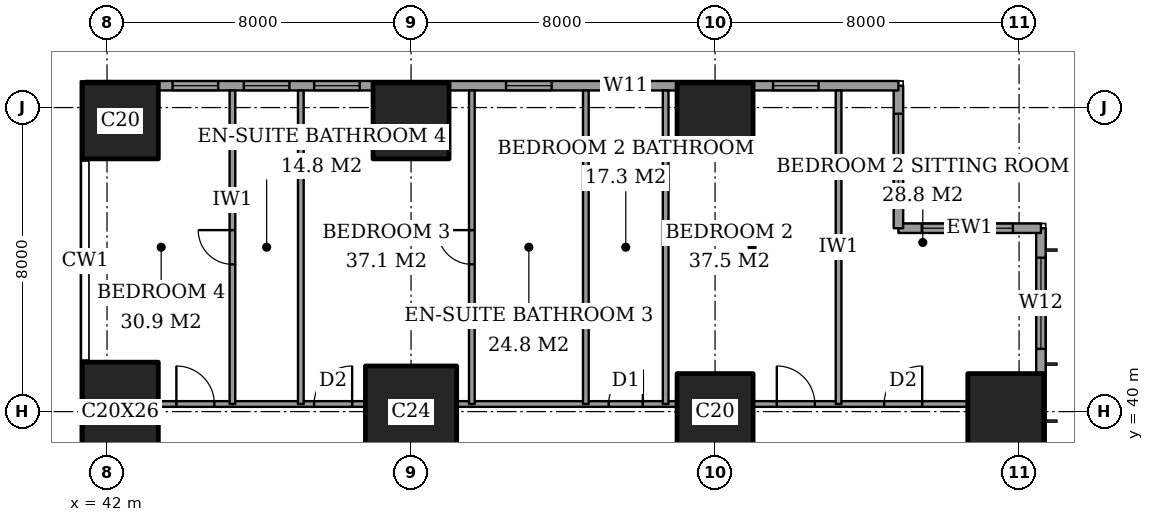
"""IFC4 building model, lengths in metres.
Left out: names, types, materials, properties, quantities, classifications, styles, units other than length and angle.
Written with IfcOpenShell. Run it as: python <this file> out.ifc"""

import sys

from ifc_helpers import new_model, si_unit, direction, frame, frame_2d, origin, origin_2d, place, context, subcontext, project, spatial, rectangle, extrude, element, fill, save


model = new_model("IFC4")
c1 = context("Model", 3, precision=1e-05, world=origin(), true_north=direction((0.0, 1.0)))
c2 = subcontext(c1, "Body", "Model", "MODEL_VIEW")
j1 = project(units=[si_unit("LENGTHUNIT", "METRE"), si_unit("PLANEANGLEUNIT", "RADIAN")], contexts=[c1])
p1 = place(None, origin())
s1 = spatial("IfcSite", under=j1, at=p1, CompositionType="ELEMENT")
p2 = place(p1, origin())
s2 = spatial("IfcBuilding", under=s1, at=p2, CompositionType="ELEMENT")
p3 = place(p2, frame((0.0, 0.0, 153.8)))
s3 = spatial("IfcBuildingStorey", under=s2, at=p3, CompositionType="ELEMENT", Elevation=153.8)
p4 = place(p3, frame((42.35, 40.0, 0.0), z_axis=(0.0, 0.0, 1.0), x_axis=(1.0, 0.0, 0.0)))
e1 = element("IfcColumn", 1, at=p4, inside=s3, PredefinedType="COLUMN", context=c2, shape_type="SweptSolid", body=[
    extrude(rectangle(XDim=2.0, YDim=2.6, at=origin_2d()), origin(), (0.0, 0.0, 1.0), 3.6),
])
p5 = place(p3, frame((42.35, 47.65, 0.0), z_axis=(0.0, 0.0, 1.0), x_axis=(1.0, 0.0, 0.0)))
e2 = element("IfcColumn", 2, at=p5, inside=s3, PredefinedType="COLUMN", context=c2, shape_type="SweptSolid", body=[
    extrude(rectangle(XDim=2.0, YDim=2.0, at=origin_2d()), origin(), (0.0, 0.0, 1.0), 3.6),
])
p6 = place(p3, frame((50.0, 40.0, 0.0), z_axis=(0.0, 0.0, 1.0), x_axis=(1.0, 0.0, 0.0)))
e3 = element("IfcColumn", 3, at=p6, inside=s3, PredefinedType="COLUMN", context=c2, shape_type="SweptSolid", body=[
    extrude(rectangle(XDim=2.4, YDim=2.4, at=origin_2d()), origin(), (0.0, 0.0, 1.0), 3.6),
])
for number, where, z_axis, x_axis in (
    (4, (50.0, 47.65, 0.0), (0.0, 0.0, 1.0), (1.0, 0.0, 0.0)),
    (5, (58.0, 40.0, 0.0), (0.0, 0.0, 1.0), (1.0, 0.0, 0.0)),
    (6, (58.0, 47.65, 0.0), (0.0, 0.0, 1.0), (1.0, 0.0, 0.0)),
    (7, (65.65, 40.0, 0.0), (0.0, 0.0, 1.0), (1.0, 0.0, 0.0)),
):
    element("IfcColumn", number, at=place(p3, frame(where, z_axis=z_axis, x_axis=x_axis)), inside=s3, PredefinedType="COLUMN", context=c2, shape_type="SweptSolid", body=[
        extrude(rectangle(XDim=2.0, YDim=2.0, at=origin_2d()), origin(), (0.0, 0.0, 1.0), 3.6),
    ])
p7 = place(p3, frame((66.575, 3.175, 0.0), z_axis=(0.0, 0.0, 1.0), x_axis=(0.0, 1.0, 0.0)))
e8 = element("IfcWall", 8, at=p7, inside=s3, PredefinedType="SOLIDWALL", context=c2, shape_type="SweptSolid", body=[
    extrude(rectangle(XDim=41.65, YDim=0.25, at=frame_2d((20.825, 0.0))), origin(), (0.0, 0.0, 1.0), 3.6),
])
p8 = place(p7, frame((0.775, 0.0, 0.4)))
e9 = element("IfcOpeningElement", 9, at=p8, cuts=e8, PredefinedType="OPENING", context=c2, shape_type="SweptSolid", body=[
    extrude(rectangle(XDim=2.4, YDim=2.2, at=frame_2d((1.2, 1.1))), frame((0.0, 0.135, 0.0), z_axis=(0.0, -1.0, 0.0), x_axis=(1.0, 0.0, 0.0)), (0.0, 0.0, 1.0), 0.27),
])
p9 = place(p7, frame((6.225, 0.0, 0.4)))
e10 = element("IfcOpeningElement", 10, at=p9, cuts=e8, PredefinedType="OPENING", context=c2, shape_type="SweptSolid", body=[
    extrude(rectangle(XDim=1.2, YDim=2.2, at=frame_2d((0.6, 1.1))), frame((0.0, 0.135, 0.0), z_axis=(0.0, -1.0, 0.0), x_axis=(1.0, 0.0, 0.0)), (0.0, 0.0, 1.0), 0.27),
])
p10 = place(p7, frame((8.475, 0.0, 0.4)))
e11 = element("IfcOpeningElement", 11, at=p10, cuts=e8, PredefinedType="OPENING", context=c2, shape_type="SweptSolid", body=[
    extrude(rectangle(XDim=2.4, YDim=2.2, at=frame_2d((1.2, 1.1))), frame((0.0, 0.135, 0.0), z_axis=(0.0, -1.0, 0.0), x_axis=(1.0, 0.0, 0.0)), (0.0, 0.0, 1.0), 0.27),
])
p11 = place(p7, frame((15.775, 0.0, 0.4)))
e12 = element("IfcOpeningElement", 12, at=p11, cuts=e8, PredefinedType="OPENING", context=c2, shape_type="SweptSolid", body=[
    extrude(rectangle(XDim=2.4, YDim=2.2, at=frame_2d((1.2, 1.1))), frame((0.0, 0.135, 0.0), z_axis=(0.0, -1.0, 0.0), x_axis=(1.0, 0.0, 0.0)), (0.0, 0.0, 1.0), 0.27),
])
p12 = place(p7, frame((23.475, 0.0, 0.4)))
e13 = element("IfcOpeningElement", 13, at=p12, cuts=e8, PredefinedType="OPENING", context=c2, shape_type="SweptSolid", body=[
    extrude(rectangle(XDim=2.4, YDim=2.2, at=frame_2d((1.2, 1.1))), frame((0.0, 0.135, 0.0), z_axis=(0.0, -1.0, 0.0), x_axis=(1.0, 0.0, 0.0)), (0.0, 0.0, 1.0), 0.27),
])
p13 = place(p7, frame((30.975, 0.0, 0.4)))
e14 = element("IfcOpeningElement", 14, at=p13, cuts=e8, PredefinedType="OPENING", context=c2, shape_type="SweptSolid", body=[
    extrude(rectangle(XDim=2.4, YDim=2.2, at=frame_2d((1.2, 1.1))), frame((0.0, 0.135, 0.0), z_axis=(0.0, -1.0, 0.0), x_axis=(1.0, 0.0, 0.0)), (0.0, 0.0, 1.0), 0.27),
])
p14 = place(p7, frame((34.5, 0.0, 0.4)))
e15 = element("IfcOpeningElement", 15, at=p14, cuts=e8, PredefinedType="OPENING", context=c2, shape_type="SweptSolid", body=[
    extrude(rectangle(XDim=1.2, YDim=2.2, at=frame_2d((0.6, 1.1))), frame((0.0, 0.135, 0.0), z_axis=(0.0, -1.0, 0.0), x_axis=(1.0, 0.0, 0.0)), (0.0, 0.0, 1.0), 0.27),
])
p15 = place(p7, frame((38.475, 0.0, 0.4)))
e16 = element("IfcOpeningElement", 16, at=p15, cuts=e8, PredefinedType="OPENING", context=c2, shape_type="SweptSolid", body=[
    extrude(rectangle(XDim=2.4, YDim=2.2, at=frame_2d((1.2, 1.1))), frame((0.0, 0.135, 0.0), z_axis=(0.0, -1.0, 0.0), x_axis=(1.0, 0.0, 0.0)), (0.0, 0.0, 1.0), 0.27),
])
p16 = place(p3, frame((66.575, 44.825, 0.0), z_axis=(0.0, 0.0, 1.0), x_axis=(-1.0, 0.0, 0.0)))
e17 = element("IfcWall", 17, at=p16, inside=s3, PredefinedType="SOLIDWALL", context=c2, shape_type="SweptSolid", body=[
    extrude(rectangle(XDim=3.75, YDim=0.25, at=frame_2d((1.875, 0.0))), origin(), (0.0, 0.0, 1.0), 3.6),
])
p17 = place(p16, frame((0.738, 0.0, 0.4)))
e18 = element("IfcOpeningElement", 18, at=p17, cuts=e17, PredefinedType="OPENING", context=c2, shape_type="SweptSolid", body=[
    extrude(rectangle(XDim=2.4, YDim=2.2, at=frame_2d((1.2, 1.1))), frame((0.0, 0.135, 0.0), z_axis=(0.0, -1.0, 0.0), x_axis=(1.0, 0.0, 0.0)), (0.0, 0.0, 1.0), 0.27),
])
p18 = place(p3, frame((62.825, 44.825, 0.0), z_axis=(0.0, 0.0, 1.0), x_axis=(0.0, 1.0, 0.0)))
e19 = element("IfcWall", 19, at=p18, inside=s3, PredefinedType="SOLIDWALL", context=c2, shape_type="SweptSolid", body=[
    extrude(rectangle(XDim=3.75, YDim=0.25, at=frame_2d((1.875, 0.0))), origin(), (0.0, 0.0, 1.0), 3.6),
])
p19 = place(p18, frame((0.613, 0.0, 0.4)))
e20 = element("IfcOpeningElement", 20, at=p19, cuts=e19, PredefinedType="OPENING", context=c2, shape_type="SweptSolid", body=[
    extrude(rectangle(XDim=2.4, YDim=2.2, at=frame_2d((1.2, 1.1))), frame((0.0, 0.135, 0.0), z_axis=(0.0, -1.0, 0.0), x_axis=(1.0, 0.0, 0.0)), (0.0, 0.0, 1.0), 0.27),
])
p20 = place(p3, frame((62.825, 48.575, 0.0), z_axis=(0.0, 0.0, 1.0), x_axis=(-1.0, 0.0, 0.0)))
e21 = element("IfcWall", 21, at=p20, inside=s3, PredefinedType="SOLIDWALL", context=c2, shape_type="SweptSolid", body=[
    extrude(rectangle(XDim=21.4, YDim=0.25, at=frame_2d((10.7, 0.0))), origin(), (0.0, 0.0, 1.0), 3.6),
])
p21 = place(p20, frame((2.1, 0.0, 0.4)))
e22 = element("IfcOpeningElement", 22, at=p21, cuts=e21, PredefinedType="OPENING", context=c2, shape_type="SweptSolid", body=[
    extrude(rectangle(XDim=1.2, YDim=2.2, at=frame_2d((0.6, 1.1))), frame((0.0, 0.135, 0.0), z_axis=(0.0, -1.0, 0.0), x_axis=(1.0, 0.0, 0.0)), (0.0, 0.0, 1.0), 0.27),
])
p22 = place(p20, frame((6.575, 0.0, 0.4)))
e23 = element("IfcOpeningElement", 23, at=p22, cuts=e21, PredefinedType="OPENING", context=c2, shape_type="SweptSolid", body=[
    extrude(rectangle(XDim=1.2, YDim=2.2, at=frame_2d((0.6, 1.1))), frame((0.0, 0.135, 0.0), z_axis=(0.0, -1.0, 0.0), x_axis=(1.0, 0.0, 0.0)), (0.0, 0.0, 1.0), 0.27),
])
p23 = place(p20, frame((9.125, 0.0, 0.4)))
e24 = element("IfcOpeningElement", 24, at=p23, cuts=e21, PredefinedType="OPENING", context=c2, shape_type="SweptSolid", body=[
    extrude(rectangle(XDim=1.2, YDim=2.2, at=frame_2d((0.6, 1.1))), frame((0.0, 0.135, 0.0), z_axis=(0.0, -1.0, 0.0), x_axis=(1.0, 0.0, 0.0)), (0.0, 0.0, 1.0), 0.27),
])
p24 = place(p20, frame((14.175, 0.0, 0.4)))
e25 = element("IfcOpeningElement", 25, at=p24, cuts=e21, PredefinedType="OPENING", context=c2, shape_type="SweptSolid", body=[
    extrude(rectangle(XDim=1.2, YDim=2.2, at=frame_2d((0.6, 1.1))), frame((0.0, 0.135, 0.0), z_axis=(0.0, -1.0, 0.0), x_axis=(1.0, 0.0, 0.0)), (0.0, 0.0, 1.0), 0.27),
])
p25 = place(p20, frame((16.025, 0.0, 0.4)))
e26 = element("IfcOpeningElement", 26, at=p25, cuts=e21, PredefinedType="OPENING", context=c2, shape_type="SweptSolid", body=[
    extrude(rectangle(XDim=1.2, YDim=2.2, at=frame_2d((0.6, 1.1))), frame((0.0, 0.135, 0.0), z_axis=(0.0, -1.0, 0.0), x_axis=(1.0, 0.0, 0.0)), (0.0, 0.0, 1.0), 0.27),
])
p26 = place(p20, frame((17.9, 0.0, 0.4)))
e27 = element("IfcOpeningElement", 27, at=p26, cuts=e21, PredefinedType="OPENING", context=c2, shape_type="SweptSolid", body=[
    extrude(rectangle(XDim=1.2, YDim=2.2, at=frame_2d((0.6, 1.1))), frame((0.0, 0.135, 0.0), z_axis=(0.0, -1.0, 0.0), x_axis=(1.0, 0.0, 0.0)), (0.0, 0.0, 1.0), 0.27),
])
p27 = place(p3, frame((43.35, 40.2, 0.0), z_axis=(0.0, 0.0, 1.0), x_axis=(1.0, 0.0, 0.0)))
e28 = element("IfcWall", 28, at=p27, inside=s3, PredefinedType="PARTITIONING", context=c2, shape_type="SweptSolid", body=[
    extrude(rectangle(XDim=5.45, YDim=0.15, at=frame_2d((2.725, 0.0))), origin(), (0.0, 0.0, 1.0), 3.35),
])
p28 = place(p27, frame((4.1, 0.0, 0.0)))
e29 = element("IfcOpeningElement", 29, at=p28, cuts=e28, PredefinedType="OPENING", context=c2, shape_type="SweptSolid", body=[
    extrude(rectangle(XDim=1.0, YDim=2.1, at=frame_2d((0.5, 1.05))), frame((0.0, 0.085, 0.0), z_axis=(0.0, -1.0, 0.0), x_axis=(1.0, 0.0, 0.0)), (0.0, 0.0, 1.0), 0.17),
])
p29 = place(p27, frame((0.475, 0.0, 0.0)))
e30 = element("IfcOpeningElement", 30, at=p29, cuts=e28, PredefinedType="OPENING", context=c2, shape_type="SweptSolid", body=[
    extrude(rectangle(XDim=1.0, YDim=2.1, at=frame_2d((0.5, 1.05))), frame((0.0, 0.085, 0.0), z_axis=(0.0, -1.0, 0.0), x_axis=(1.0, 0.0, 0.0)), (0.0, 0.0, 1.0), 0.17),
])
p30 = place(p3, frame((51.2, 40.2, 0.0), z_axis=(0.0, 0.0, 1.0), x_axis=(1.0, 0.0, 0.0)))
e31 = element("IfcWall", 31, at=p30, inside=s3, PredefinedType="PARTITIONING", context=c2, shape_type="SweptSolid", body=[
    extrude(rectangle(XDim=5.8, YDim=0.15, at=frame_2d((2.9, 0.0))), origin(), (0.0, 0.0, 1.0), 3.35),
])
p31 = place(p30, frame((4.0, 0.0, 0.0)))
e32 = element("IfcOpeningElement", 32, at=p31, cuts=e31, PredefinedType="OPENING", context=c2, shape_type="SweptSolid", body=[
    extrude(rectangle(XDim=0.9, YDim=2.1, at=frame_2d((0.45, 1.05))), frame((0.0, 0.085, 0.0), z_axis=(0.0, -1.0, 0.0), x_axis=(1.0, 0.0, 0.0)), (0.0, 0.0, 1.0), 0.17),
])
p32 = place(p3, frame((59.0, 40.2, 0.0), z_axis=(0.0, 0.0, 1.0), x_axis=(1.0, 0.0, 0.0)))
e33 = element("IfcWall", 33, at=p32, inside=s3, PredefinedType="PARTITIONING", context=c2, shape_type="SweptSolid", body=[
    extrude(rectangle(XDim=5.65, YDim=0.15, at=frame_2d((2.825, 0.0))), origin(), (0.0, 0.0, 1.0), 3.35),
])
p33 = place(p32, frame((3.45, 0.0, 0.0)))
e34 = element("IfcOpeningElement", 34, at=p33, cuts=e33, PredefinedType="OPENING", context=c2, shape_type="SweptSolid", body=[
    extrude(rectangle(XDim=1.0, YDim=2.1, at=frame_2d((0.5, 1.05))), frame((0.0, 0.085, 0.0), z_axis=(0.0, -1.0, 0.0), x_axis=(1.0, 0.0, 0.0)), (0.0, 0.0, 1.0), 0.17),
])
p34 = place(p32, frame((0.625, 0.0, 0.0)))
e35 = element("IfcOpeningElement", 35, at=p34, cuts=e33, PredefinedType="OPENING", context=c2, shape_type="SweptSolid", body=[
    extrude(rectangle(XDim=1.0, YDim=2.1, at=frame_2d((0.5, 1.05))), frame((0.0, 0.085, 0.0), z_axis=(0.0, -1.0, 0.0), x_axis=(1.0, 0.0, 0.0)), (0.0, 0.0, 1.0), 0.17),
])
p35 = place(p3, frame((45.3, 40.2, 0.0), z_axis=(0.0, 0.0, 1.0), x_axis=(0.0, 1.0, 0.0)))
e36 = element("IfcWall", 36, at=p35, inside=s3, PredefinedType="PARTITIONING", context=c2, shape_type="SweptSolid", body=[
    extrude(rectangle(XDim=8.25, YDim=0.15, at=frame_2d((4.125, 0.0))), origin(), (0.0, 0.0, 1.0), 3.35),
])
p36 = place(p35, frame((3.675, 0.0, 0.0)))
e37 = element("IfcOpeningElement", 37, at=p36, cuts=e36, PredefinedType="OPENING", context=c2, shape_type="SweptSolid", body=[
    extrude(rectangle(XDim=0.9, YDim=2.1, at=frame_2d((0.45, 1.05))), frame((0.0, 0.085, 0.0), z_axis=(0.0, -1.0, 0.0), x_axis=(1.0, 0.0, 0.0)), (0.0, 0.0, 1.0), 0.17),
])
p37 = place(p3, frame((47.1, 40.2, 0.0), z_axis=(0.0, 0.0, 1.0), x_axis=(0.0, 1.0, 0.0)))
e38 = element("IfcWall", 38, at=p37, inside=s3, PredefinedType="PARTITIONING", context=c2, shape_type="SweptSolid", body=[
    extrude(rectangle(XDim=8.25, YDim=0.15, at=frame_2d((4.125, 0.0))), origin(), (0.0, 0.0, 1.0), 3.35),
])
p38 = place(p3, frame((51.6, 40.2, 0.0), z_axis=(0.0, 0.0, 1.0), x_axis=(0.0, 1.0, 0.0)))
e39 = element("IfcWall", 39, at=p38, inside=s3, PredefinedType="PARTITIONING", context=c2, shape_type="SweptSolid", body=[
    extrude(rectangle(XDim=8.25, YDim=0.15, at=frame_2d((4.125, 0.0))), origin(), (0.0, 0.0, 1.0), 3.35),
])
p39 = place(p38, frame((3.675, 0.0, 0.0)))
e40 = element("IfcOpeningElement", 40, at=p39, cuts=e39, PredefinedType="OPENING", context=c2, shape_type="SweptSolid", body=[
    extrude(rectangle(XDim=0.9, YDim=2.1, at=frame_2d((0.45, 1.05))), frame((0.0, 0.085, 0.0), z_axis=(0.0, -1.0, 0.0), x_axis=(1.0, 0.0, 0.0)), (0.0, 0.0, 1.0), 0.17),
])
for number, where, z_axis, x_axis in (
    (41, (54.6, 40.2, 0.0), (0.0, 0.0, 1.0), (0.0, 1.0, 0.0)),
    (42, (56.7, 40.2, 0.0), (0.0, 0.0, 1.0), (0.0, 1.0, 0.0)),
    (43, (61.25, 40.2, 0.0), (0.0, 0.0, 1.0), (0.0, 1.0, 0.0)),
):
    element("IfcWall", number, at=place(p3, frame(where, z_axis=z_axis, x_axis=x_axis)), inside=s3, PredefinedType="PARTITIONING", context=c2, shape_type="SweptSolid", body=[
        extrude(rectangle(XDim=8.25, YDim=0.15, at=frame_2d((4.125, 0.0))), origin(), (0.0, 0.0, 1.0), 3.35),
    ])
p40 = place(p15, origin())
e44 = element("IfcWindow", 44, at=p40, inside=s3, PartitioningType="SINGLE_PANEL", PredefinedType="WINDOW", context=c2, shape_type="SweptSolid", body=[
    extrude(rectangle(XDim=2.4, YDim=2.2, at=frame_2d((1.2, 1.1))), frame((0.0, 0.03, 0.0), z_axis=(0.0, -1.0, 0.0), x_axis=(1.0, 0.0, 0.0)), (0.0, 0.0, 1.0), 0.06),
])
fill(e16, e44)
p41 = place(p17, origin())
e45 = element("IfcWindow", 45, at=p41, inside=s3, PartitioningType="SINGLE_PANEL", PredefinedType="WINDOW", context=c2, shape_type="SweptSolid", body=[
    extrude(rectangle(XDim=2.4, YDim=2.2, at=frame_2d((1.2, 1.1))), frame((0.0, 0.03, 0.0), z_axis=(0.0, -1.0, 0.0), x_axis=(1.0, 0.0, 0.0)), (0.0, 0.0, 1.0), 0.06),
])
fill(e18, e45)
p42 = place(p19, origin())
e46 = element("IfcWindow", 46, at=p42, inside=s3, PartitioningType="SINGLE_PANEL", PredefinedType="WINDOW", context=c2, shape_type="SweptSolid", body=[
    extrude(rectangle(XDim=2.4, YDim=2.2, at=frame_2d((1.2, 1.1))), frame((0.0, 0.03, 0.0), z_axis=(0.0, -1.0, 0.0), x_axis=(1.0, 0.0, 0.0)), (0.0, 0.0, 1.0), 0.06),
])
fill(e20, e46)
p43 = place(p21, origin())
e47 = element("IfcWindow", 47, at=p43, inside=s3, PartitioningType="SINGLE_PANEL", PredefinedType="WINDOW", context=c2, shape_type="SweptSolid", body=[
    extrude(rectangle(XDim=1.2, YDim=2.2, at=frame_2d((0.6, 1.1))), frame((0.0, 0.03, 0.0), z_axis=(0.0, -1.0, 0.0), x_axis=(1.0, 0.0, 0.0)), (0.0, 0.0, 1.0), 0.06),
])
fill(e22, e47)
p44 = place(p22, origin())
e48 = element("IfcWindow", 48, at=p44, inside=s3, PartitioningType="SINGLE_PANEL", PredefinedType="WINDOW", context=c2, shape_type="SweptSolid", body=[
    extrude(rectangle(XDim=1.2, YDim=2.2, at=frame_2d((0.6, 1.1))), frame((0.0, 0.03, 0.0), z_axis=(0.0, -1.0, 0.0), x_axis=(1.0, 0.0, 0.0)), (0.0, 0.0, 1.0), 0.06),
])
fill(e23, e48)
p45 = place(p23, origin())
e49 = element("IfcWindow", 49, at=p45, inside=s3, PartitioningType="SINGLE_PANEL", PredefinedType="WINDOW", context=c2, shape_type="SweptSolid", body=[
    extrude(rectangle(XDim=1.2, YDim=2.2, at=frame_2d((0.6, 1.1))), frame((0.0, 0.03, 0.0), z_axis=(0.0, -1.0, 0.0), x_axis=(1.0, 0.0, 0.0)), (0.0, 0.0, 1.0), 0.06),
])
fill(e24, e49)
p46 = place(p24, origin())
e50 = element("IfcWindow", 50, at=p46, inside=s3, PartitioningType="SINGLE_PANEL", PredefinedType="WINDOW", context=c2, shape_type="SweptSolid", body=[
    extrude(rectangle(XDim=1.2, YDim=2.2, at=frame_2d((0.6, 1.1))), frame((0.0, 0.03, 0.0), z_axis=(0.0, -1.0, 0.0), x_axis=(1.0, 0.0, 0.0)), (0.0, 0.0, 1.0), 0.06),
])
fill(e25, e50)
p47 = place(p25, origin())
e51 = element("IfcWindow", 51, at=p47, inside=s3, PartitioningType="SINGLE_PANEL", PredefinedType="WINDOW", context=c2, shape_type="SweptSolid", body=[
    extrude(rectangle(XDim=1.2, YDim=2.2, at=frame_2d((0.6, 1.1))), frame((0.0, 0.03, 0.0), z_axis=(0.0, -1.0, 0.0), x_axis=(1.0, 0.0, 0.0)), (0.0, 0.0, 1.0), 0.06),
])
fill(e26, e51)
p48 = place(p26, origin())
e52 = element("IfcWindow", 52, at=p48, inside=s3, PartitioningType="SINGLE_PANEL", PredefinedType="WINDOW", context=c2, shape_type="SweptSolid", body=[
    extrude(rectangle(XDim=1.2, YDim=2.2, at=frame_2d((0.6, 1.1))), frame((0.0, 0.03, 0.0), z_axis=(0.0, -1.0, 0.0), x_axis=(1.0, 0.0, 0.0)), (0.0, 0.0, 1.0), 0.06),
])
fill(e27, e52)
p49 = place(p33, origin())
e53 = element("IfcDoor", 53, at=p49, inside=s3, OperationType="SINGLE_SWING_LEFT", PredefinedType="DOOR", context=c2, shape_type="SweptSolid", body=[
    extrude(rectangle(XDim=1.0, YDim=2.1, at=frame_2d((0.5, 1.05))), frame((0.0, 0.025, 0.0), z_axis=(0.0, -1.0, 0.0), x_axis=(1.0, 0.0, 0.0)), (0.0, 0.0, 1.0), 0.05),
])
fill(e34, e53)
p50 = place(p34, origin())
e54 = element("IfcDoor", 54, at=p50, inside=s3, OperationType="SINGLE_SWING_RIGHT", PredefinedType="DOOR", context=c2, shape_type="SweptSolid", body=[
    extrude(rectangle(XDim=1.0, YDim=2.1, at=frame_2d((0.5, 1.05))), frame((0.0, 0.025, 0.0), z_axis=(0.0, -1.0, 0.0), x_axis=(1.0, 0.0, 0.0)), (0.0, 0.0, 1.0), 0.05),
])
fill(e35, e54)
p51 = place(p31, origin())
e55 = element("IfcDoor", 55, at=p51, inside=s3, OperationType="SINGLE_SWING_LEFT", PredefinedType="DOOR", context=c2, shape_type="SweptSolid", body=[
    extrude(rectangle(XDim=0.9, YDim=2.1, at=frame_2d((0.45, 1.05))), frame((0.0, 0.025, 0.0), z_axis=(0.0, -1.0, 0.0), x_axis=(1.0, 0.0, 0.0)), (0.0, 0.0, 1.0), 0.05),
])
fill(e32, e55)
p52 = place(p39, origin())
e56 = element("IfcDoor", 56, at=p52, inside=s3, OperationType="SINGLE_SWING_LEFT", PredefinedType="DOOR", context=c2, shape_type="SweptSolid", body=[
    extrude(rectangle(XDim=0.9, YDim=2.1, at=frame_2d((0.45, 1.05))), frame((0.0, 0.025, 0.0), z_axis=(0.0, -1.0, 0.0), x_axis=(1.0, 0.0, 0.0)), (0.0, 0.0, 1.0), 0.05),
])
fill(e40, e56)
p53 = place(p28, origin())
e57 = element("IfcDoor", 57, at=p53, inside=s3, OperationType="SINGLE_SWING_LEFT", PredefinedType="DOOR", context=c2, shape_type="SweptSolid", body=[
    extrude(rectangle(XDim=1.0, YDim=2.1, at=frame_2d((0.5, 1.05))), frame((0.0, 0.025, 0.0), z_axis=(0.0, -1.0, 0.0), x_axis=(1.0, 0.0, 0.0)), (0.0, 0.0, 1.0), 0.05),
])
fill(e29, e57)
p54 = place(p36, origin())
e58 = element("IfcDoor", 58, at=p54, inside=s3, OperationType="SINGLE_SWING_LEFT", PredefinedType="DOOR", context=c2, shape_type="SweptSolid", body=[
    extrude(rectangle(XDim=0.9, YDim=2.1, at=frame_2d((0.45, 1.05))), frame((0.0, 0.025, 0.0), z_axis=(0.0, -1.0, 0.0), x_axis=(1.0, 0.0, 0.0)), (0.0, 0.0, 1.0), 0.05),
])
fill(e37, e58)
p55 = place(p29, origin())
e59 = element("IfcDoor", 59, at=p55, inside=s3, OperationType="SINGLE_SWING_RIGHT", PredefinedType="DOOR", context=c2, shape_type="SweptSolid", body=[
    extrude(rectangle(XDim=1.0, YDim=2.1, at=frame_2d((0.5, 1.05))), frame((0.0, 0.025, 0.0), z_axis=(0.0, -1.0, 0.0), x_axis=(1.0, 0.0, 0.0)), (0.0, 0.0, 1.0), 0.05),
])
fill(e30, e59)
save(model, sys.argv[1])
